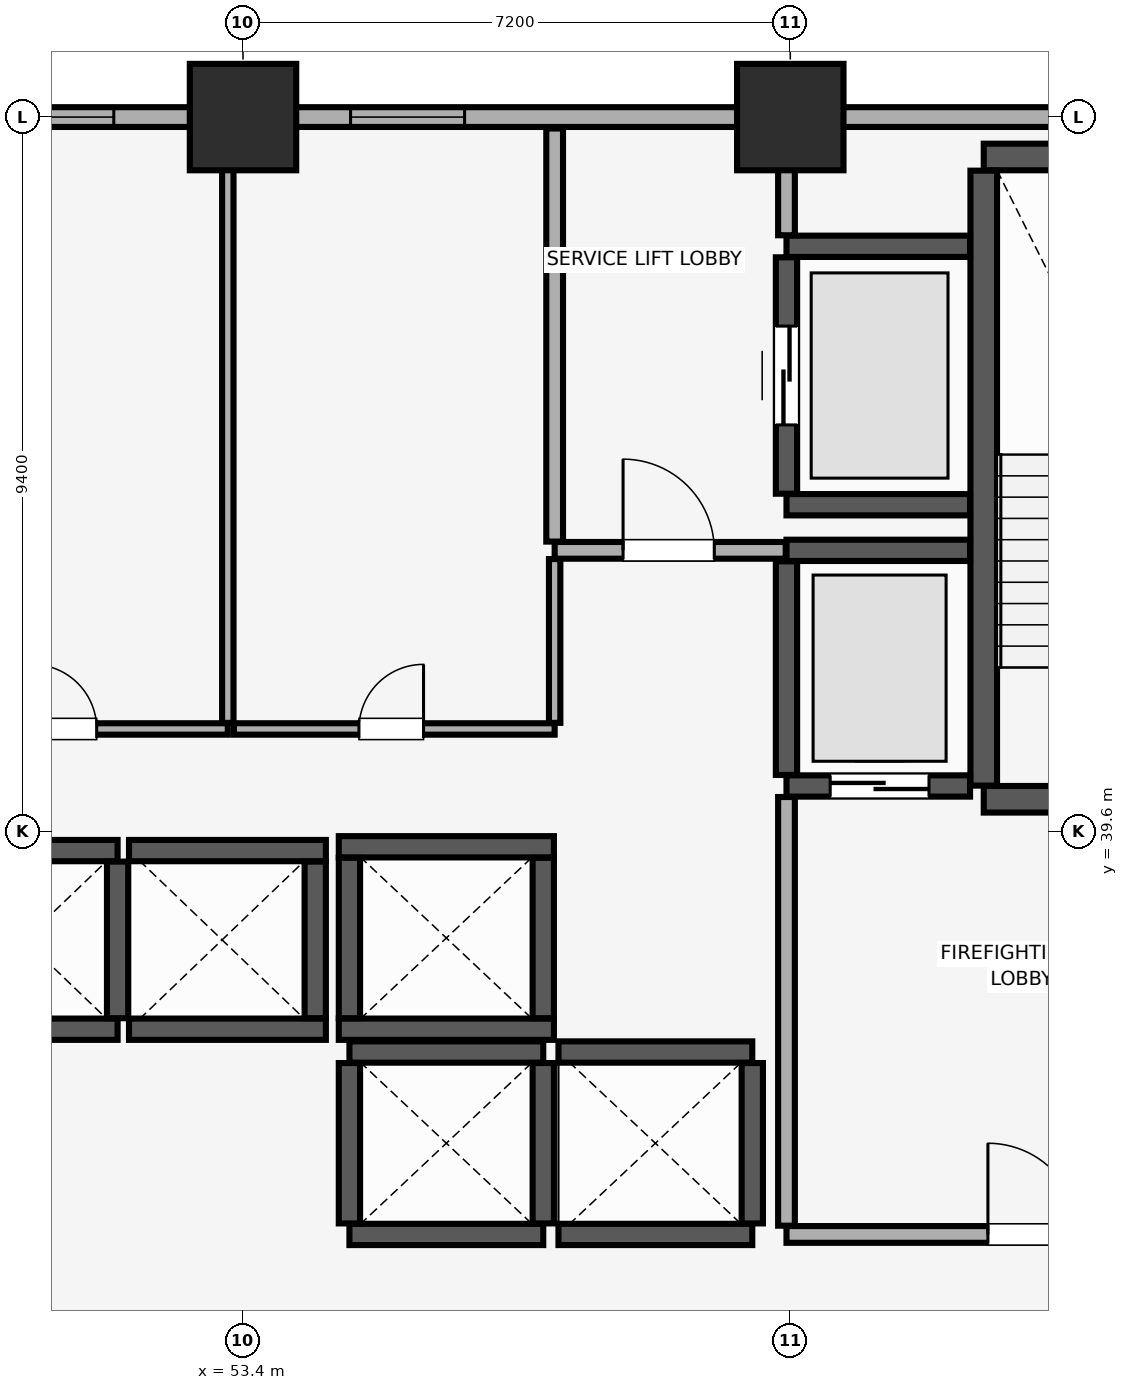
"""IFC4 building model, lengths in metres.
Left out: names, types, materials, properties, quantities, classifications, styles, units other than length and angle.
Written with IfcOpenShell. Run it as: python <this file> out.ifc"""

import sys

from ifc_helpers import new_model, si_unit, direction, frame, frame_2d, origin, origin_2d, place, context, subcontext, project, spatial, rectangle, extrude, element, fill, save


model = new_model("IFC4")
c1 = context("Model", 3, precision=1e-05, world=origin(), true_north=direction((0.0, 1.0)))
c2 = subcontext(c1, "Body", "Model", "MODEL_VIEW")
j1 = project(units=[si_unit("LENGTHUNIT", "METRE"), si_unit("PLANEANGLEUNIT", "RADIAN")], contexts=[c1])
p1 = place(None, origin())
s1 = spatial("IfcSite", under=j1, at=p1, CompositionType="ELEMENT")
p2 = place(p1, origin())
s2 = spatial("IfcBuilding", under=s1, at=p2, CompositionType="ELEMENT")
p3 = place(p2, frame((0.0, 0.0, 72.65)))
s3 = spatial("IfcBuildingStorey", under=s2, at=p3, CompositionType="ELEMENT", Elevation=72.65)
for number, where, z_axis, x_axis in (
    (1, (53.4, 49.0, 0.0), (0.0, 0.0, 1.0), (1.0, 0.0, 0.0)),
    (2, (60.6, 49.0, 0.0), (0.0, 0.0, 1.0), (1.0, 0.0, 0.0)),
):
    element("IfcColumn", number, at=place(p3, frame(where, z_axis=z_axis, x_axis=x_axis)), inside=s3, PredefinedType="COLUMN", context=c2, shape_type="SweptSolid", body=[
        extrude(rectangle(XDim=1.4, YDim=1.4, at=origin_2d()), origin(), (0.0, 0.0, 1.0), 3.51),
    ])
p4 = place(p3, frame((79.8, 49.0, 0.0), z_axis=(0.0, 0.0, 1.0), x_axis=(-1.0, 0.0, 0.0)))
e3 = element("IfcWall", 3, at=p4, inside=s3, PredefinedType="SOLIDWALL", context=c2, shape_type="SweptSolid", body=[
    extrude(rectangle(XDim=75.6, YDim=0.26, at=frame_2d((37.8, 0.0))), origin(), (0.0, 0.0, 1.0), 2.56),
])
p5 = place(p4, frame((72.565, 0.0, 0.85)))
e4 = element("IfcOpeningElement", 4, at=p5, cuts=e3, PredefinedType="OPENING", context=c2, shape_type="SweptSolid", body=[
    extrude(rectangle(XDim=1.5, YDim=1.4, at=frame_2d((0.75, 0.7))), frame((0.0, 0.14, 0.0), z_axis=(0.0, -1.0, 0.0), x_axis=(1.0, 0.0, 0.0)), (0.0, 0.0, 1.0), 0.28),
])
p6 = place(p4, frame((67.45, 0.0, 0.85)))
e5 = element("IfcOpeningElement", 5, at=p6, cuts=e3, PredefinedType="OPENING", context=c2, shape_type="SweptSolid", body=[
    extrude(rectangle(XDim=1.5, YDim=1.4, at=frame_2d((0.75, 0.7))), frame((0.0, 0.14, 0.0), z_axis=(0.0, -1.0, 0.0), x_axis=(1.0, 0.0, 0.0)), (0.0, 0.0, 1.0), 0.28),
])
p7 = place(p4, frame((6.65, 0.0, 0.85)))
e6 = element("IfcOpeningElement", 6, at=p7, cuts=e3, PredefinedType="OPENING", context=c2, shape_type="SweptSolid", body=[
    extrude(rectangle(XDim=1.5, YDim=1.4, at=frame_2d((0.75, 0.7))), frame((0.0, 0.14, 0.0), z_axis=(0.0, -1.0, 0.0), x_axis=(1.0, 0.0, 0.0)), (0.0, 0.0, 1.0), 0.28),
])
p8 = place(p4, frame((1.535, 0.0, 0.85)))
e7 = element("IfcOpeningElement", 7, at=p8, cuts=e3, PredefinedType="OPENING", context=c2, shape_type="SweptSolid", body=[
    extrude(rectangle(XDim=1.5, YDim=1.4, at=frame_2d((0.75, 0.7))), frame((0.0, 0.14, 0.0), z_axis=(0.0, -1.0, 0.0), x_axis=(1.0, 0.0, 0.0)), (0.0, 0.0, 1.0), 0.28),
])
p9 = place(p4, frame((51.365, 0.0, 0.9)))
e8 = element("IfcOpeningElement", 8, at=p9, cuts=e3, PredefinedType="OPENING", context=c2, shape_type="SweptSolid", body=[
    extrude(rectangle(XDim=1.5, YDim=1.4, at=frame_2d((0.75, 0.7))), frame((0.0, 0.14, 0.0), z_axis=(0.0, -1.0, 0.0), x_axis=(1.0, 0.0, 0.0)), (0.0, 0.0, 1.0), 0.28),
])
p10 = place(p4, frame((44.55, 0.0, 0.9)))
e9 = element("IfcOpeningElement", 9, at=p10, cuts=e3, PredefinedType="OPENING", context=c2, shape_type="SweptSolid", body=[
    extrude(rectangle(XDim=1.5, YDim=1.4, at=frame_2d((0.75, 0.7))), frame((0.0, 0.14, 0.0), z_axis=(0.0, -1.0, 0.0), x_axis=(1.0, 0.0, 0.0)), (0.0, 0.0, 1.0), 0.28),
])
p11 = place(p4, frame((28.1, 0.0, 0.9)))
e10 = element("IfcOpeningElement", 10, at=p11, cuts=e3, PredefinedType="OPENING", context=c2, shape_type="SweptSolid", body=[
    extrude(rectangle(XDim=1.5, YDim=1.4, at=frame_2d((0.75, 0.7))), frame((0.0, 0.14, 0.0), z_axis=(0.0, -1.0, 0.0), x_axis=(1.0, 0.0, 0.0)), (0.0, 0.0, 1.0), 0.28),
])
p12 = place(p4, frame((23.485, 0.0, 0.9)))
e11 = element("IfcOpeningElement", 11, at=p12, cuts=e3, PredefinedType="OPENING", context=c2, shape_type="SweptSolid", body=[
    extrude(rectangle(XDim=1.5, YDim=1.4, at=frame_2d((0.75, 0.7))), frame((0.0, 0.14, 0.0), z_axis=(0.0, -1.0, 0.0), x_axis=(1.0, 0.0, 0.0)), (0.0, 0.0, 1.0), 0.28),
])
p13 = place(p3, frame((63.145, 40.025, 0.0), z_axis=(0.0, 0.0, 1.0), x_axis=(1.0, 0.0, 0.0)))
e12 = element("IfcWall", 12, at=p13, inside=s3, PredefinedType="SHEAR", context=c2, shape_type="SweptSolid", body=[
    extrude(rectangle(XDim=4.1, YDim=0.35, at=frame_2d((2.05, 0.0))), origin(), (0.0, 0.0, 1.0), 3.51),
])
p14 = place(p13, frame((1.24, 0.0, 0.0)))
e13 = element("IfcOpeningElement", 13, at=p14, cuts=e12, PredefinedType="OPENING", context=c2, shape_type="SweptSolid", body=[
    extrude(rectangle(XDim=1.15, YDim=2.15, at=frame_2d((0.575, 1.075))), frame((0.0, 0.185, 0.0), z_axis=(0.0, -1.0, 0.0), x_axis=(1.0, 0.0, 0.0)), (0.0, 0.0, 1.0), 0.37),
])
p15 = place(p3, frame((63.145, 48.475, 0.0), z_axis=(0.0, 0.0, 1.0), x_axis=(1.0, 0.0, 0.0)))
e14 = element("IfcWall", 14, at=p15, inside=s3, PredefinedType="SHEAR", context=c2, shape_type="SweptSolid", body=[
    extrude(rectangle(XDim=3.95, YDim=0.35, at=frame_2d((1.975, 0.0))), origin(), (0.0, 0.0, 1.0), 3.51),
])
p16 = place(p3, frame((63.145, 40.205, 0.0), z_axis=(0.0, 0.0, 1.0), x_axis=(0.0, 1.0, 0.0)))
e15 = element("IfcWall", 15, at=p16, inside=s3, PredefinedType="SHEAR", context=c2, shape_type="SweptSolid", body=[
    extrude(rectangle(XDim=8.09, YDim=0.35, at=frame_2d((4.045, 0.0))), origin(), (0.0, 0.0, 1.0), 3.51),
])
for number, where, z_axis, x_axis in (
    (16, (49.3, 37.0, 0.0), (0.0, 0.0, 1.0), (1.0, 0.0, 0.0)),
    (17, (49.3, 39.35, 0.0), (0.0, 0.0, 1.0), (1.0, 0.0, 0.0)),
):
    element("IfcWall", number, at=place(p3, frame(where, z_axis=z_axis, x_axis=x_axis)), inside=s3, PredefinedType="SHEAR", context=c2, shape_type="SweptSolid", body=[
        extrude(rectangle(XDim=2.45, YDim=0.28, at=frame_2d((1.225, 0.0))), origin(), (0.0, 0.0, 1.0), 3.51),
    ])
p17 = place(p3, frame((51.75, 37.145, 0.0), z_axis=(0.0, 0.0, 1.0), x_axis=(0.0, 1.0, 0.0)))
e18 = element("IfcWall", 18, at=p17, inside=s3, PredefinedType="SHEAR", context=c2, shape_type="SweptSolid", body=[
    extrude(rectangle(XDim=2.06, YDim=0.28, at=frame_2d((1.03, 0.0))), origin(), (0.0, 0.0, 1.0), 3.51),
])
for number, where, z_axis, x_axis in (
    (19, (51.9, 37.0, 0.0), (0.0, 0.0, 1.0), (1.0, 0.0, 0.0)),
    (20, (51.9, 39.35, 0.0), (0.0, 0.0, 1.0), (1.0, 0.0, 0.0)),
):
    element("IfcWall", number, at=place(p3, frame(where, z_axis=z_axis, x_axis=x_axis)), inside=s3, PredefinedType="SHEAR", context=c2, shape_type="SweptSolid", body=[
        extrude(rectangle(XDim=2.59, YDim=0.28, at=frame_2d((1.295, 0.0))), origin(), (0.0, 0.0, 1.0), 3.51),
    ])
p18 = place(p3, frame((54.35, 37.145, 0.0), z_axis=(0.0, 0.0, 1.0), x_axis=(0.0, 1.0, 0.0)))
e21 = element("IfcWall", 21, at=p18, inside=s3, PredefinedType="SHEAR", context=c2, shape_type="SweptSolid", body=[
    extrude(rectangle(XDim=2.06, YDim=0.28, at=frame_2d((1.03, 0.0))), origin(), (0.0, 0.0, 1.0), 3.51),
])
for number, where, z_axis, x_axis in (
    (22, (54.8, 34.3, 0.0), (0.0, 0.0, 1.0), (1.0, 0.0, 0.0)),
    (23, (54.8, 36.7, 0.0), (0.0, 0.0, 1.0), (1.0, 0.0, 0.0)),
):
    element("IfcWall", number, at=place(p3, frame(where, z_axis=z_axis, x_axis=x_axis)), inside=s3, PredefinedType="SHEAR", context=c2, shape_type="SweptSolid", body=[
        extrude(rectangle(XDim=2.55, YDim=0.28, at=frame_2d((1.275, 0.0))), origin(), (0.0, 0.0, 1.0), 3.51),
    ])
for number, where, z_axis, x_axis in (
    (24, (54.8, 34.445, 0.0), (0.0, 0.0, 1.0), (0.0, 1.0, 0.0)),
    (25, (57.35, 34.445, 0.0), (0.0, 0.0, 1.0), (0.0, 1.0, 0.0)),
):
    element("IfcWall", number, at=place(p3, frame(where, z_axis=z_axis, x_axis=x_axis)), inside=s3, PredefinedType="SHEAR", context=c2, shape_type="SweptSolid", body=[
        extrude(rectangle(XDim=2.11, YDim=0.28, at=frame_2d((1.055, 0.0))), origin(), (0.0, 0.0, 1.0), 3.51),
    ])
for number, where, z_axis, x_axis in (
    (26, (57.55, 34.3, 0.0), (0.0, 0.0, 1.0), (1.0, 0.0, 0.0)),
    (27, (57.55, 36.7, 0.0), (0.0, 0.0, 1.0), (1.0, 0.0, 0.0)),
):
    element("IfcWall", number, at=place(p3, frame(where, z_axis=z_axis, x_axis=x_axis)), inside=s3, PredefinedType="SHEAR", context=c2, shape_type="SweptSolid", body=[
        extrude(rectangle(XDim=2.55, YDim=0.28, at=frame_2d((1.275, 0.0))), origin(), (0.0, 0.0, 1.0), 3.51),
    ])
p19 = place(p3, frame((60.1, 34.445, 0.0), z_axis=(0.0, 0.0, 1.0), x_axis=(0.0, 1.0, 0.0)))
e28 = element("IfcWall", 28, at=p19, inside=s3, PredefinedType="SHEAR", context=c2, shape_type="SweptSolid", body=[
    extrude(rectangle(XDim=2.11, YDim=0.28, at=frame_2d((1.055, 0.0))), origin(), (0.0, 0.0, 1.0), 3.51),
])
for number, where, z_axis, x_axis in (
    (29, (54.66, 37.0, 0.0), (0.0, 0.0, 1.0), (1.0, 0.0, 0.0)),
    (30, (54.66, 39.4, 0.0), (0.0, 0.0, 1.0), (1.0, 0.0, 0.0)),
):
    element("IfcWall", number, at=place(p3, frame(where, z_axis=z_axis, x_axis=x_axis)), inside=s3, PredefinedType="SHEAR", context=c2, shape_type="SweptSolid", body=[
        extrude(rectangle(XDim=2.83, YDim=0.28, at=frame_2d((1.415, 0.0))), origin(), (0.0, 0.0, 1.0), 3.51),
    ])
for number, where, z_axis, x_axis in (
    (31, (54.8, 37.145, 0.0), (0.0, 0.0, 1.0), (0.0, 1.0, 0.0)),
    (32, (57.35, 37.145, 0.0), (0.0, 0.0, 1.0), (0.0, 1.0, 0.0)),
):
    element("IfcWall", number, at=place(p3, frame(where, z_axis=z_axis, x_axis=x_axis)), inside=s3, PredefinedType="SHEAR", context=c2, shape_type="SweptSolid", body=[
        extrude(rectangle(XDim=2.11, YDim=0.28, at=frame_2d((1.055, 0.0))), origin(), (0.0, 0.0, 1.0), 3.51),
    ])
p20 = place(p3, frame((60.55, 40.2, 0.0), z_axis=(0.0, 0.0, 1.0), x_axis=(1.0, 0.0, 0.0)))
e33 = element("IfcWall", 33, at=p20, inside=s3, PredefinedType="SHEAR", context=c2, shape_type="SweptSolid", body=[
    extrude(rectangle(XDim=2.415, YDim=0.28, at=frame_2d((1.208, 0.0))), origin(), (0.0, 0.0, 1.0), 3.51),
])
p21 = place(p20, frame((0.575, 0.0, 0.0)))
e34 = element("IfcOpeningElement", 34, at=p21, cuts=e33, PredefinedType="OPENING", context=c2, shape_type="SweptSolid", body=[
    extrude(rectangle(XDim=1.3, YDim=2.3, at=frame_2d((0.65, 1.15))), frame((0.0, 0.15, 0.0), z_axis=(0.0, -1.0, 0.0), x_axis=(1.0, 0.0, 0.0)), (0.0, 0.0, 1.0), 0.3),
])
p22 = place(p3, frame((60.55, 43.3, 0.0), z_axis=(0.0, 0.0, 1.0), x_axis=(1.0, 0.0, 0.0)))
e35 = element("IfcWall", 35, at=p22, inside=s3, PredefinedType="SHEAR", context=c2, shape_type="SweptSolid", body=[
    extrude(rectangle(XDim=2.415, YDim=0.28, at=frame_2d((1.208, 0.0))), origin(), (0.0, 0.0, 1.0), 3.51),
])
p23 = place(p3, frame((60.55, 40.345, 0.0), z_axis=(0.0, 0.0, 1.0), x_axis=(0.0, 1.0, 0.0)))
e36 = element("IfcWall", 36, at=p23, inside=s3, PredefinedType="SHEAR", context=c2, shape_type="SweptSolid", body=[
    extrude(rectangle(XDim=2.81, YDim=0.28, at=frame_2d((1.405, 0.0))), origin(), (0.0, 0.0, 1.0), 3.51),
])
for number, where, z_axis, x_axis in (
    (37, (60.55, 43.9, 0.0), (0.0, 0.0, 1.0), (1.0, 0.0, 0.0)),
    (38, (60.55, 47.3, 0.0), (0.0, 0.0, 1.0), (1.0, 0.0, 0.0)),
):
    element("IfcWall", number, at=place(p3, frame(where, z_axis=z_axis, x_axis=x_axis)), inside=s3, PredefinedType="SHEAR", context=c2, shape_type="SweptSolid", body=[
        extrude(rectangle(XDim=2.415, YDim=0.28, at=frame_2d((1.208, 0.0))), origin(), (0.0, 0.0, 1.0), 3.51),
    ])
p24 = place(p3, frame((60.55, 44.045, 0.0), z_axis=(0.0, 0.0, 1.0), x_axis=(0.0, 1.0, 0.0)))
e39 = element("IfcWall", 39, at=p24, inside=s3, PredefinedType="SHEAR", context=c2, shape_type="SweptSolid", body=[
    extrude(rectangle(XDim=3.11, YDim=0.28, at=frame_2d((1.555, 0.0))), origin(), (0.0, 0.0, 1.0), 3.51),
])
p25 = place(p24, frame((0.905, 0.0, 0.0)))
e40 = element("IfcOpeningElement", 40, at=p25, cuts=e39, PredefinedType="OPENING", context=c2, shape_type="SweptSolid", body=[
    extrude(rectangle(XDim=1.3, YDim=2.3, at=frame_2d((0.65, 1.15))), frame((0.0, 0.15, 0.0), z_axis=(0.0, -1.0, 0.0), x_axis=(1.0, 0.0, 0.0)), (0.0, 0.0, 1.0), 0.3),
])
p26 = place(p3, frame((60.55, 34.3, 0.0), z_axis=(0.0, 0.0, 1.0), x_axis=(1.0, 0.0, 0.0)))
e41 = element("IfcWall", 41, at=p26, inside=s3, PredefinedType="PARTITIONING", context=c2, shape_type="SweptSolid", body=[
    extrude(rectangle(XDim=6.05, YDim=0.22, at=frame_2d((3.025, 0.0))), origin(), (0.0, 0.0, 1.0), 3.51),
])
p27 = place(p26, frame((2.65, 0.0, 0.0)))
e42 = element("IfcOpeningElement", 42, at=p27, cuts=e41, PredefinedType="OPENING", context=c2, shape_type="SweptSolid", body=[
    extrude(rectangle(XDim=1.2, YDim=2.15, at=frame_2d((0.6, 1.075))), frame((0.0, 0.12, 0.0), z_axis=(0.0, -1.0, 0.0), x_axis=(1.0, 0.0, 0.0)), (0.0, 0.0, 1.0), 0.24),
])
p28 = place(p3, frame((60.55, 34.415, 0.0), z_axis=(0.0, 0.0, 1.0), x_axis=(0.0, 1.0, 0.0)))
e43 = element("IfcWall", 43, at=p28, inside=s3, PredefinedType="PARTITIONING", context=c2, shape_type="SweptSolid", body=[
    extrude(rectangle(XDim=5.64, YDim=0.22, at=frame_2d((2.82, 0.0))), origin(), (0.0, 0.0, 1.0), 3.51),
])
p29 = place(p3, frame((57.5, 43.3, 0.0), z_axis=(0.0, 0.0, 1.0), x_axis=(1.0, 0.0, 0.0)))
e44 = element("IfcWall", 44, at=p29, inside=s3, PredefinedType="PARTITIONING", context=c2, shape_type="SweptSolid", body=[
    extrude(rectangle(XDim=3.04, YDim=0.22, at=frame_2d((1.52, 0.0))), origin(), (0.0, 0.0, 1.0), 3.51),
])
p30 = place(p29, frame((0.9, 0.0, 0.0)))
e45 = element("IfcOpeningElement", 45, at=p30, cuts=e44, PredefinedType="OPENING", context=c2, shape_type="SweptSolid", body=[
    extrude(rectangle(XDim=1.2, YDim=2.15, at=frame_2d((0.6, 1.075))), frame((0.0, 0.12, 0.0), z_axis=(0.0, -1.0, 0.0), x_axis=(1.0, 0.0, 0.0)), (0.0, 0.0, 1.0), 0.24),
])
p31 = place(p3, frame((57.5, 43.415, 0.0), z_axis=(0.0, 0.0, 1.0), x_axis=(0.0, 1.0, 0.0)))
e46 = element("IfcWall", 46, at=p31, inside=s3, PredefinedType="PARTITIONING", context=c2, shape_type="SweptSolid", body=[
    extrude(rectangle(XDim=5.435, YDim=0.22, at=frame_2d((2.718, 0.0))), origin(), (0.0, 0.0, 1.0), 3.51),
])
p32 = place(p3, frame((60.55, 47.445, 0.0), z_axis=(0.0, 0.0, 1.0), x_axis=(0.0, 1.0, 0.0)))
e47 = element("IfcWall", 47, at=p32, inside=s3, PredefinedType="PARTITIONING", context=c2, shape_type="SweptSolid", body=[
    extrude(rectangle(XDim=1.405, YDim=0.22, at=frame_2d((0.703, 0.0))), origin(), (0.0, 0.0, 1.0), 3.51),
])
p33 = place(p3, frame((48.968, 40.95, 0.0), z_axis=(0.0, 0.0, 1.0), x_axis=(1.0, 0.0, 0.0)))
e48 = element("IfcWall", 48, at=p33, inside=s3, PredefinedType="PARTITIONING", context=c2, shape_type="SweptSolid", body=[
    extrude(rectangle(XDim=4.232, YDim=0.15, at=frame_2d((2.116, 0.0))), origin(), (0.0, 0.0, 1.0), 3.51),
])
p34 = place(p33, frame((1.657, 0.0, 0.0)))
e49 = element("IfcOpeningElement", 49, at=p34, cuts=e48, PredefinedType="OPENING", context=c2, shape_type="SweptSolid", body=[
    extrude(rectangle(XDim=0.85, YDim=2.1, at=frame_2d((0.425, 1.05))), frame((0.0, 0.085, 0.0), z_axis=(0.0, -1.0, 0.0), x_axis=(1.0, 0.0, 0.0)), (0.0, 0.0, 1.0), 0.17),
])
p35 = place(p3, frame((53.2, 41.03, 0.0), z_axis=(0.0, 0.0, 1.0), x_axis=(0.0, 1.0, 0.0)))
e50 = element("IfcWall", 50, at=p35, inside=s3, PredefinedType="PARTITIONING", context=c2, shape_type="SweptSolid", body=[
    extrude(rectangle(XDim=7.82, YDim=0.15, at=frame_2d((3.91, 0.0))), origin(), (0.0, 0.0, 1.0), 3.51),
])
p36 = place(p3, frame((53.28, 40.95, 0.0), z_axis=(0.0, 0.0, 1.0), x_axis=(1.0, 0.0, 0.0)))
e51 = element("IfcWall", 51, at=p36, inside=s3, PredefinedType="PARTITIONING", context=c2, shape_type="SweptSolid", body=[
    extrude(rectangle(XDim=4.22, YDim=0.15, at=frame_2d((2.11, 0.0))), origin(), (0.0, 0.0, 1.0), 3.51),
])
p37 = place(p36, frame((1.645, 0.0, 0.0)))
e52 = element("IfcOpeningElement", 52, at=p37, cuts=e51, PredefinedType="OPENING", context=c2, shape_type="SweptSolid", body=[
    extrude(rectangle(XDim=0.85, YDim=2.1, at=frame_2d((0.425, 1.05))), frame((0.0, 0.085, 0.0), z_axis=(0.0, -1.0, 0.0), x_axis=(1.0, 0.0, 0.0)), (0.0, 0.0, 1.0), 0.17),
])
p38 = place(p3, frame((57.5, 41.03, 0.0), z_axis=(0.0, 0.0, 1.0), x_axis=(0.0, 1.0, 0.0)))
e53 = element("IfcWall", 53, at=p38, inside=s3, PredefinedType="PARTITIONING", context=c2, shape_type="SweptSolid", body=[
    extrude(rectangle(XDim=2.155, YDim=0.15, at=frame_2d((1.078, 0.0))), origin(), (0.0, 0.0, 1.0), 3.51),
])
p39 = place(p11, origin())
e54 = element("IfcWindow", 54, at=p39, inside=s3, PartitioningType="SINGLE_PANEL", PredefinedType="WINDOW", context=c2, shape_type="SweptSolid", body=[
    extrude(rectangle(XDim=1.5, YDim=1.4, at=frame_2d((0.75, 0.7))), frame((0.0, 0.03, 0.0), z_axis=(0.0, -1.0, 0.0), x_axis=(1.0, 0.0, 0.0)), (0.0, 0.0, 1.0), 0.06),
])
fill(e10, e54)
p40 = place(p12, origin())
e55 = element("IfcWindow", 55, at=p40, inside=s3, PartitioningType="SINGLE_PANEL", PredefinedType="WINDOW", context=c2, shape_type="SweptSolid", body=[
    extrude(rectangle(XDim=1.5, YDim=1.4, at=frame_2d((0.75, 0.7))), frame((0.0, 0.03, 0.0), z_axis=(0.0, -1.0, 0.0), x_axis=(1.0, 0.0, 0.0)), (0.0, 0.0, 1.0), 0.06),
])
fill(e11, e55)
p41 = place(p21, origin())
e56 = element("IfcDoor", 56, at=p41, inside=s3, OperationType="DOUBLE_DOOR_SLIDING", PredefinedType="DOOR", context=c2, shape_type="SweptSolid", body=[
    extrude(rectangle(XDim=1.3, YDim=2.3, at=frame_2d((0.65, 1.15))), frame((0.0, 0.025, 0.0), z_axis=(0.0, -1.0, 0.0), x_axis=(1.0, 0.0, 0.0)), (0.0, 0.0, 1.0), 0.05),
])
fill(e34, e56)
p42 = place(p25, origin())
e57 = element("IfcDoor", 57, at=p42, inside=s3, OperationType="DOUBLE_DOOR_SLIDING", PredefinedType="DOOR", context=c2, shape_type="SweptSolid", body=[
    extrude(rectangle(XDim=1.3, YDim=2.3, at=frame_2d((0.65, 1.15))), frame((0.0, 0.025, 0.0), z_axis=(0.0, -1.0, 0.0), x_axis=(1.0, 0.0, 0.0)), (0.0, 0.0, 1.0), 0.05),
])
fill(e40, e57)
p43 = place(p27, origin())
e58 = element("IfcDoor", 58, at=p43, inside=s3, OperationType="SINGLE_SWING_LEFT", PredefinedType="DOOR", context=c2, shape_type="SweptSolid", body=[
    extrude(rectangle(XDim=1.2, YDim=2.15, at=frame_2d((0.6, 1.075))), frame((0.0, 0.025, 0.0), z_axis=(0.0, -1.0, 0.0), x_axis=(1.0, 0.0, 0.0)), (0.0, 0.0, 1.0), 0.05),
])
fill(e42, e58)
p44 = place(p30, origin())
e59 = element("IfcDoor", 59, at=p44, inside=s3, OperationType="SINGLE_SWING_LEFT", PredefinedType="DOOR", context=c2, shape_type="SweptSolid", body=[
    extrude(rectangle(XDim=1.2, YDim=2.15, at=frame_2d((0.6, 1.075))), frame((0.0, 0.025, 0.0), z_axis=(0.0, -1.0, 0.0), x_axis=(1.0, 0.0, 0.0)), (0.0, 0.0, 1.0), 0.05),
])
fill(e45, e59)
p45 = place(p34, origin())
e60 = element("IfcDoor", 60, at=p45, inside=s3, OperationType="SINGLE_SWING_LEFT", PredefinedType="DOOR", context=c2, shape_type="SweptSolid", body=[
    extrude(rectangle(XDim=0.85, YDim=2.1, at=frame_2d((0.425, 1.05))), frame((0.0, 0.025, 0.0), z_axis=(0.0, -1.0, 0.0), x_axis=(1.0, 0.0, 0.0)), (0.0, 0.0, 1.0), 0.05),
])
fill(e49, e60)
p46 = place(p37, origin())
e61 = element("IfcDoor", 61, at=p46, inside=s3, OperationType="SINGLE_SWING_RIGHT", PredefinedType="DOOR", context=c2, shape_type="SweptSolid", body=[
    extrude(rectangle(XDim=0.85, YDim=2.1, at=frame_2d((0.425, 1.05))), frame((0.0, 0.025, 0.0), z_axis=(0.0, -1.0, 0.0), x_axis=(1.0, 0.0, 0.0)), (0.0, 0.0, 1.0), 0.05),
])
fill(e52, e61)
save(model, sys.argv[1])
